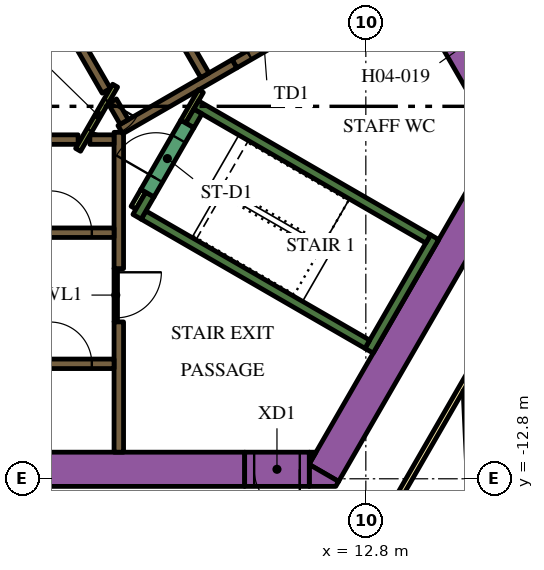
"""IFC4 building model, lengths in metres.
Left out: names, types, materials, properties, quantities, classifications, styles, units other than length and angle.
Written with IfcOpenShell. Run it as: python <this file> out.ifc"""

import sys

from ifc_helpers import new_model, si_unit, direction, frame, frame_2d, origin, place, context, subcontext, project, spatial, polyline, rectangle, outline, extrude, element, fill, save


model = new_model("IFC4")
c1 = context("Model", 3, precision=1e-05, world=origin(), true_north=direction((0.0, 1.0)))
c2 = subcontext(c1, "Body", "Model", "MODEL_VIEW")
j1 = project(units=[si_unit("LENGTHUNIT", "METRE"), si_unit("PLANEANGLEUNIT", "RADIAN")], contexts=[c1])
p1 = place(None, origin())
s1 = spatial("IfcSite", under=j1, at=p1, CompositionType="ELEMENT")
p2 = place(p1, origin())
s2 = spatial("IfcBuilding", under=s1, at=p2, CompositionType="ELEMENT")
p3 = place(p2, frame((0.0, 0.0, 66.6)))
s3 = spatial("IfcBuildingStorey", under=s2, at=p3, CompositionType="ELEMENT", Elevation=66.6)
p4 = place(p3, frame((6.461, 13.909, 0.0), z_axis=(0.0, 0.0, 1.0), x_axis=(0.500005804227, -0.866022052686, 0.0)))
e1 = element("IfcWall", 1, at=p4, inside=s3, PredefinedType="SOLIDWALL", context=c2, shape_type="SweptSolid", body=[
    extrude(rectangle(XDim=20.834, YDim=0.9, at=frame_2d((10.417, 0.0))), origin(), (0.0, 0.0, 1.0), 3.9),
])
p5 = place(p3, frame((11.695, -12.644, 0.0), z_axis=(0.0, 0.0, 1.0), x_axis=(0.500010229568, 0.86601949766, 0.0)))
e2 = element("IfcWall", 2, at=p5, inside=s3, PredefinedType="SOLIDWALL", context=c2, shape_type="SweptSolid", body=[
    extrude(rectangle(XDim=9.326, YDim=0.9, at=frame_2d((4.663, 0.0))), origin(), (0.0, 0.0, 1.0), 3.9),
])
p6 = place(p3, origin())
e3 = element("IfcWall", 3, at=p6, inside=s3, PredefinedType="SOLIDWALL", context=c2, shape_type="SweptSolid", body=[
    extrude(outline(polyline([(12.009, -13.0), (11.312, -13.0), (11.312, -12.425), (12.083, -12.871), (12.009, -13.0)])), origin(), (0.0, 0.0, 1.0), 3.9),
])
e4 = element("IfcWall", 4, at=p6, inside=s3, PredefinedType="SOLIDWALL", context=c2, shape_type="SweptSolid", body=[
    extrude(outline(polyline([(11.489, -12.1), (11.312, -12.407), (11.312, -12.1), (11.489, -12.1)])), origin(), (0.0, 0.0, 1.0), 3.9),
])
p7 = place(p3, frame((-12.019, -12.55, 0.0), z_axis=(0.0, 0.0, 1.0), x_axis=(1.0, 0.0, 0.0)))
e5 = element("IfcWall", 5, at=p7, inside=s3, PredefinedType="SOLIDWALL", context=c2, shape_type="SweptSolid", body=[
    extrude(rectangle(XDim=21.63, YDim=0.9, at=frame_2d((10.815, 0.0))), origin(), (0.0, 0.0, 1.0), 3.9),
])
p8 = place(p3, frame((12.885, -9.431, 0.0), z_axis=(0.0, 0.0, 1.0), x_axis=(0.500020560727, 0.866013532718, 0.0)))
e6 = element("IfcWall", 6, at=p8, inside=s3, PredefinedType="SOLIDWALL", context=c2, shape_type="SweptSolid", body=[
    extrude(rectangle(XDim=3.45, YDim=0.25, at=frame_2d((1.725, 0.0))), origin(), (0.0, 0.0, 1.0), 3.9),
])
p9 = place(p3, frame((12.84, -9.261, 0.0), z_axis=(0.0, 0.0, 1.0), x_axis=(-0.866013990052, 0.500019768644, 0.0)))
e7 = element("IfcWall", 7, at=p9, inside=s3, PredefinedType="SOLIDWALL", context=c2, shape_type="SweptSolid", body=[
    extrude(rectangle(XDim=6.8, YDim=0.25, at=frame_2d((3.4, 0.0))), origin(), (0.0, 0.0, 1.0), 3.9),
])
p10 = place(p3, frame((6.78, -5.906, 0.0), z_axis=(0.0, 0.0, 1.0), x_axis=(0.500223362819, 0.865896406789, 0.0)))
e8 = element("IfcWall", 8, at=p10, inside=s3, PredefinedType="SOLIDWALL", context=c2, shape_type="SweptSolid", body=[
    extrude(rectangle(XDim=0.675, YDim=0.25, at=frame_2d((0.337, 0.0))), origin(), (0.0, 0.0, 1.0), 3.9),
])
p11 = place(p3, frame((8.334, -2.964, 0.0), z_axis=(0.0, 0.0, 1.0), x_axis=(0.866016039709, -0.500016218704, 0.0)))
e9 = element("IfcWall", 9, at=p11, inside=s3, PredefinedType="SOLIDWALL", context=c2, shape_type="SweptSolid", body=[
    extrude(rectangle(XDim=7.05, YDim=0.25, at=frame_2d((3.525, 0.0))), origin(), (0.0, 0.0, 1.0), 3.9),
])
p12 = place(p3, frame((8.168, -3.503, 0.0), z_axis=(0.0, 0.0, 1.0), x_axis=(0.49972245349, 0.866185586049, 0.0)))
e10 = element("IfcWall", 10, at=p12, inside=s3, PredefinedType="SOLIDWALL", context=c2, shape_type="SweptSolid", body=[
    extrude(rectangle(XDim=0.425, YDim=0.25, at=frame_2d((0.212, 0.0))), origin(), (0.0, 0.0, 1.0), 3.9),
])
p13 = place(p3, frame((-5.259, -3.875, 0.0), z_axis=(0.0, 0.0, 1.0), x_axis=(1.0, 0.0, 0.0)))
e11 = element("IfcWall", 11, at=p13, inside=s3, PredefinedType="SOLIDWALL", context=c2, shape_type="SweptSolid", body=[
    extrude(rectangle(XDim=10.489, YDim=0.25, at=frame_2d((5.244, 0.0))), origin(), (0.0, 0.0, 1.0), 3.9),
])
p14 = place(p3, frame((6.3, -7.27, 0.0), z_axis=(0.0, 0.0, 1.0), x_axis=(0.0, 1.0, 0.0)))
e12 = element("IfcWall", 12, at=p14, inside=s3, PredefinedType="SOLIDWALL", context=c2, shape_type="SweptSolid", body=[
    extrude(rectangle(XDim=3.586, YDim=0.25, at=frame_2d((1.793, 0.0))), origin(), (0.0, 0.0, 1.0), 3.9),
])
p15 = place(p3, frame((6.3, -12.1, 0.0), z_axis=(0.0, 0.0, 1.0), x_axis=(0.0, 1.0, 0.0)))
e13 = element("IfcWall", 13, at=p15, inside=s3, PredefinedType="SOLIDWALL", context=c2, shape_type="SweptSolid", body=[
    extrude(rectangle(XDim=3.428, YDim=0.25, at=frame_2d((1.714, 0.0))), origin(), (0.0, 0.0, 1.0), 3.9),
])
p16 = place(p3, frame((5.538, -3.875, 0.0), z_axis=(0.0, 0.0, 1.0), x_axis=(1.0, 0.0, 0.0)))
e14 = element("IfcWall", 14, at=p16, inside=s3, PredefinedType="SOLIDWALL", context=c2, shape_type="SweptSolid", body=[
    extrude(rectangle(XDim=0.637, YDim=0.25, at=frame_2d((0.318, 0.0))), origin(), (0.0, 0.0, 1.0), 3.9),
])
p17 = place(p3, frame((9.346, -1.879, 0.0), z_axis=(0.0, 0.0, 1.0), x_axis=(-0.866048528039, -0.499959945477, 0.0)))
e15 = element("IfcWall", 15, at=p17, inside=s3, PredefinedType="SOLIDWALL", context=c2, shape_type="SweptSolid", body=[
    extrude(rectangle(XDim=3.47, YDim=0.25, at=frame_2d((1.735, 0.0))), origin(), (0.0, 0.0, 1.0), 3.9),
])
p18 = place(p3, frame((6.13, -2.867, 0.0), z_axis=(0.0, 0.0, 1.0), x_axis=(0.500160776593, -0.865932559475, 0.0)))
e16 = element("IfcWall", 16, at=p18, inside=s3, PredefinedType="SOLIDWALL", context=c2, shape_type="SweptSolid", body=[
    extrude(rectangle(XDim=0.627, YDim=0.25, at=frame_2d((0.313, 0.0))), origin(), (0.0, 0.0, 1.0), 3.9),
])
p19 = place(p3, frame((5.97, -2.591, 0.0), z_axis=(0.0, 0.0, 1.0), x_axis=(-0.499994469932, 0.866028596547, 0.0)))
e17 = element("IfcWall", 17, at=p19, inside=s3, PredefinedType="SOLIDWALL", context=c2, shape_type="SweptSolid", body=[
    extrude(rectangle(XDim=10.488, YDim=0.25, at=frame_2d((5.244, 0.0))), origin(), (0.0, 0.0, 1.0), 3.9),
])
p20 = place(p3, frame((6.945, -5.222, 0.0), z_axis=(0.0, 0.0, 1.0), x_axis=(-0.499818422106, -0.866130212453, 0.0)))
e18 = element("IfcWall", 18, at=p20, inside=s3, PredefinedType="PARTITIONING", context=c2, shape_type="SweptSolid", body=[
    extrude(rectangle(XDim=0.514, YDim=0.15, at=frame_2d((0.257, 0.0))), origin(), (0.0, 0.0, 1.0), 2.75),
])
p21 = place(p3, frame((8.459, -2.599, 0.0), z_axis=(0.0, 0.0, 1.0), x_axis=(-0.500041054325, -0.866001699761, 0.0)))
e19 = element("IfcWall", 19, at=p21, inside=s3, PredefinedType="PARTITIONING", context=c2, shape_type="SweptSolid", body=[
    extrude(rectangle(XDim=0.929, YDim=0.15, at=frame_2d((0.464, 0.0))), origin(), (0.0, 0.0, 1.0), 3.9),
])
p22 = place(p3, frame((-6.175, -9.775, 0.0), z_axis=(0.0, 0.0, 1.0), x_axis=(1.0, 0.0, 0.0)))
e20 = element("IfcWall", 20, at=p22, inside=s3, PredefinedType="SOLIDWALL", context=c2, shape_type="SweptSolid", body=[
    extrude(rectangle(XDim=12.35, YDim=0.25, at=frame_2d((6.175, 0.0))), origin(), (0.0, 0.0, 1.0), 3.9),
])
p23 = place(p22, frame((0.585, 0.0, 0.0)))
e21 = element("IfcOpeningElement", 21, at=p23, cuts=e20, PredefinedType="OPENING", context=c2, shape_type="SweptSolid", body=[
    extrude(rectangle(XDim=1.1, YDim=2.1, at=frame_2d((0.55, 1.05))), frame((0.0, 0.135, 0.0), z_axis=(0.0, -1.0, 0.0), x_axis=(1.0, 0.0, 0.0)), (0.0, 0.0, 1.0), 0.27),
])
p24 = place(p22, frame((3.105, 0.0, 0.0)))
e22 = element("IfcOpeningElement", 22, at=p24, cuts=e20, PredefinedType="OPENING", context=c2, shape_type="SweptSolid", body=[
    extrude(rectangle(XDim=1.1, YDim=2.1, at=frame_2d((0.55, 1.05))), frame((0.0, 0.135, 0.0), z_axis=(0.0, -1.0, 0.0), x_axis=(1.0, 0.0, 0.0)), (0.0, 0.0, 1.0), 0.27),
])
p25 = place(p22, frame((5.625, 0.0, 0.0)))
e23 = element("IfcOpeningElement", 23, at=p25, cuts=e20, PredefinedType="OPENING", context=c2, shape_type="SweptSolid", body=[
    extrude(rectangle(XDim=1.1, YDim=2.1, at=frame_2d((0.55, 1.05))), frame((0.0, 0.135, 0.0), z_axis=(0.0, -1.0, 0.0), x_axis=(1.0, 0.0, 0.0)), (0.0, 0.0, 1.0), 0.27),
])
p26 = place(p22, frame((8.145, 0.0, 0.0)))
e24 = element("IfcOpeningElement", 24, at=p26, cuts=e20, PredefinedType="OPENING", context=c2, shape_type="SweptSolid", body=[
    extrude(rectangle(XDim=1.1, YDim=2.1, at=frame_2d((0.55, 1.05))), frame((0.0, 0.135, 0.0), z_axis=(0.0, -1.0, 0.0), x_axis=(1.0, 0.0, 0.0)), (0.0, 0.0, 1.0), 0.27),
])
p27 = place(p22, frame((10.665, 0.0, 0.0)))
e25 = element("IfcOpeningElement", 25, at=p27, cuts=e20, PredefinedType="OPENING", context=c2, shape_type="SweptSolid", body=[
    extrude(rectangle(XDim=1.1, YDim=2.1, at=frame_2d((0.55, 1.05))), frame((0.0, 0.135, 0.0), z_axis=(0.0, -1.0, 0.0), x_axis=(1.0, 0.0, 0.0)), (0.0, 0.0, 1.0), 0.27),
])
p28 = place(p3, frame((-6.175, -6.325, 0.0), z_axis=(0.0, 0.0, 1.0), x_axis=(1.0, 0.0, 0.0)))
e26 = element("IfcWall", 26, at=p28, inside=s3, PredefinedType="SOLIDWALL", context=c2, shape_type="SweptSolid", body=[
    extrude(rectangle(XDim=12.35, YDim=0.25, at=frame_2d((6.175, 0.0))), origin(), (0.0, 0.0, 1.0), 3.9),
])
p29 = place(p28, frame((3.205, 0.0, 0.0)))
e27 = element("IfcOpeningElement", 27, at=p29, cuts=e26, PredefinedType="OPENING", context=c2, shape_type="SweptSolid", body=[
    extrude(rectangle(XDim=0.9, YDim=2.1, at=frame_2d((0.45, 1.05))), frame((0.0, 0.135, 0.0), z_axis=(0.0, -1.0, 0.0), x_axis=(1.0, 0.0, 0.0)), (0.0, 0.0, 1.0), 0.27),
])
p30 = place(p28, frame((8.145, 0.0, 0.0)))
e28 = element("IfcOpeningElement", 28, at=p30, cuts=e26, PredefinedType="OPENING", context=c2, shape_type="SweptSolid", body=[
    extrude(rectangle(XDim=1.1, YDim=2.1, at=frame_2d((0.55, 1.05))), frame((0.0, 0.135, 0.0), z_axis=(0.0, -1.0, 0.0), x_axis=(1.0, 0.0, 0.0)), (0.0, 0.0, 1.0), 0.27),
])
p31 = place(p28, frame((10.665, 0.0, 0.0)))
e29 = element("IfcOpeningElement", 29, at=p31, cuts=e26, PredefinedType="OPENING", context=c2, shape_type="SweptSolid", body=[
    extrude(rectangle(XDim=1.1, YDim=2.1, at=frame_2d((0.55, 1.05))), frame((0.0, 0.135, 0.0), z_axis=(0.0, -1.0, 0.0), x_axis=(1.0, 0.0, 0.0)), (0.0, 0.0, 1.0), 0.27),
])
p32 = place(p3, frame((8.565, -2.185, 0.0), z_axis=(0.0, 0.0, 1.0), x_axis=(-0.499997954832, 0.866026584559, 0.0)))
e30 = element("IfcWall", 30, at=p32, inside=s3, PredefinedType="SOLIDWALL", context=c2, shape_type="SweptSolid", body=[
    extrude(rectangle(XDim=12.35, YDim=0.25, at=frame_2d((6.175, 0.0))), origin(), (0.0, 0.0, 1.0), 3.9),
])
p33 = place(p32, frame((5.725, 0.0, 0.0)))
e31 = element("IfcOpeningElement", 31, at=p33, cuts=e30, PredefinedType="OPENING", context=c2, shape_type="SweptSolid", body=[
    extrude(rectangle(XDim=0.9, YDim=2.1, at=frame_2d((0.45, 1.05))), frame((0.0, 0.135, 0.0), z_axis=(0.0, -1.0, 0.0), x_axis=(1.0, 0.0, 0.0)), (0.0, 0.0, 1.0), 0.27),
])
p34 = place(p3, frame((7.053, -5.284, 0.0), z_axis=(0.0, 0.0, 1.0), x_axis=(0.500078061341, 0.865980330357, 0.0)))
e32 = element("IfcWall", 32, at=p34, inside=s3, PredefinedType="SOLIDWALL", context=c2, shape_type="SweptSolid", body=[
    extrude(rectangle(XDim=2.1, YDim=0.4, at=frame_2d((1.05, 0.0))), origin(), (0.0, 0.0, 1.0), 3.9),
])
p35 = place(p34, frame((0.45, 0.0, 0.0)))
e33 = element("IfcOpeningElement", 33, at=p35, cuts=e32, PredefinedType="OPENING", context=c2, shape_type="SweptSolid", body=[
    extrude(rectangle(XDim=1.2, YDim=2.1, at=frame_2d((0.6, 1.05))), frame((0.0, 0.21, 0.0), z_axis=(0.0, -1.0, 0.0), x_axis=(1.0, 0.0, 0.0)), (0.0, 0.0, 1.0), 0.42),
])
p36 = place(p3, frame((9.346, -1.879, 0.0), z_axis=(0.0, 0.0, 1.0), x_axis=(0.866047807691, 0.499961193289, 0.0)))
e34 = element("IfcWall", 34, at=p36, inside=s3, PredefinedType="SOLIDWALL", context=c2, shape_type="SweptSolid", body=[
    extrude(rectangle(XDim=1.8, YDim=0.25, at=frame_2d((0.9, 0.0))), origin(), (0.0, 0.0, 1.0), 3.9),
])
p37 = place(p36, frame((0.45, 0.0, 0.0)))
e35 = element("IfcOpeningElement", 35, at=p37, cuts=e34, PredefinedType="OPENING", context=c2, shape_type="SweptSolid", body=[
    extrude(rectangle(XDim=0.9, YDim=2.1, at=frame_2d((0.45, 1.05))), frame((0.0, 0.135, 0.0), z_axis=(0.0, -1.0, 0.0), x_axis=(1.0, 0.0, 0.0)), (0.0, 0.0, 1.0), 0.27),
])
p38 = place(p3, frame((6.203, -2.456, 0.0), z_axis=(0.0, 0.0, 1.0), x_axis=(-0.500043961785, -0.866000020948, 0.0)))
e36 = element("IfcWall", 36, at=p38, inside=s3, PredefinedType="PARTITIONING", context=c2, shape_type="SweptSolid", body=[
    extrude(rectangle(XDim=1.95, YDim=0.15, at=frame_2d((0.975, 0.0))), origin(), (0.0, 0.0, 1.0), 3.9),
])
p39 = place(p38, frame((0.45, 0.0, 0.0)))
e37 = element("IfcOpeningElement", 37, at=p39, cuts=e36, PredefinedType="OPENING", context=c2, shape_type="SweptSolid", body=[
    extrude(rectangle(XDim=0.9, YDim=2.1, at=frame_2d((0.45, 1.05))), frame((0.0, 0.085, 0.0), z_axis=(0.0, -1.0, 0.0), x_axis=(1.0, 0.0, 0.0)), (0.0, 0.0, 1.0), 0.17),
])
p40 = place(p3, frame((6.22, -7.266, 0.0), z_axis=(0.0, 0.0, 1.0), x_axis=(0.0, -1.0, 0.0)))
e38 = element("IfcWall", 38, at=p40, inside=s3, PredefinedType="PARTITIONING", context=c2, shape_type="SweptSolid", body=[
    extrude(rectangle(XDim=1.4, YDim=0.09, at=frame_2d((0.7, 0.0))), origin(), (0.0, 0.0, 1.0), 2.75),
])
p41 = place(p40, frame((0.1, 0.0, 0.0)))
e39 = element("IfcOpeningElement", 39, at=p41, cuts=e38, PredefinedType="OPENING", context=c2, shape_type="SweptSolid", body=[
    extrude(rectangle(XDim=1.2, YDim=2.1, at=frame_2d((0.6, 1.05))), frame((0.0, 0.055, 0.0), z_axis=(0.0, -1.0, 0.0), x_axis=(1.0, 0.0, 0.0)), (0.0, 0.0, 1.0), 0.11),
])
p42 = place(p3, frame((11.312, -12.55, 0.0), z_axis=(0.0, 0.0, 1.0), x_axis=(-1.0, 0.0, 0.0)))
e40 = element("IfcWall", 40, at=p42, inside=s3, PredefinedType="SOLIDWALL", context=c2, shape_type="SweptSolid", body=[
    extrude(rectangle(XDim=1.7, YDim=0.9, at=frame_2d((0.85, 0.0))), origin(), (0.0, 0.0, 1.0), 3.9),
])
p43 = place(p42, frame((0.25, 0.0, 0.0)))
e41 = element("IfcOpeningElement", 41, at=p43, cuts=e40, PredefinedType="OPENING", context=c2, shape_type="SweptSolid", body=[
    extrude(rectangle(XDim=1.2, YDim=2.1, at=frame_2d((0.6, 1.05))), frame((0.0, 0.46, 0.0), z_axis=(0.0, -1.0, 0.0), x_axis=(1.0, 0.0, 0.0)), (0.0, 0.0, 1.0), 0.92),
])
p44 = place(p3, frame((6.163, 18.475, 0.0), z_axis=(0.0, 0.0, 1.0), x_axis=(0.500001317485, -0.866024643133, 0.0)))
e42 = element("IfcWall", 42, at=p44, inside=s3, PredefinedType="PARTITIONING", context=c2, shape_type="SweptSolid", body=[
    extrude(rectangle(XDim=25.767, YDim=0.15, at=frame_2d((12.883, 0.0))), origin(), (0.0, 0.0, 1.0), 2.75),
])
p45 = place(p44, frame((21.138, 0.0, 0.0)))
e43 = element("IfcOpeningElement", 43, at=p45, cuts=e42, PredefinedType="OPENING", context=c2, shape_type="SweptSolid", body=[
    extrude(rectangle(XDim=1.0, YDim=2.1, at=frame_2d((0.5, 1.05))), frame((0.0, 0.085, 0.0), z_axis=(0.0, -1.0, 0.0), x_axis=(1.0, 0.0, 0.0)), (0.0, 0.0, 1.0), 0.17),
])
p46 = place(p44, frame((9.948, 0.0, 0.0)))
e44 = element("IfcOpeningElement", 44, at=p46, cuts=e42, PredefinedType="OPENING", context=c2, shape_type="SweptSolid", body=[
    extrude(rectangle(XDim=1.1, YDim=2.1, at=frame_2d((0.55, 1.05))), frame((0.0, 0.085, 0.0), z_axis=(0.0, -1.0, 0.0), x_axis=(1.0, 0.0, 0.0)), (0.0, 0.0, 1.0), 0.17),
])
p47 = place(p44, frame((8.641, 0.0, 0.0)))
e45 = element("IfcOpeningElement", 45, at=p47, cuts=e42, PredefinedType="OPENING", context=c2, shape_type="SweptSolid", body=[
    extrude(rectangle(XDim=1.0, YDim=2.1, at=frame_2d((0.5, 1.05))), frame((0.0, 0.085, 0.0), z_axis=(0.0, -1.0, 0.0), x_axis=(1.0, 0.0, 0.0)), (0.0, 0.0, 1.0), 0.17),
])
p48 = place(p44, frame((0.18, 0.0, 0.0)))
e46 = element("IfcOpeningElement", 46, at=p48, cuts=e42, PredefinedType="OPENING", context=c2, shape_type="SweptSolid", body=[
    extrude(rectangle(XDim=1.0, YDim=2.1, at=frame_2d((0.5, 1.05))), frame((0.0, 0.085, 0.0), z_axis=(0.0, -1.0, 0.0), x_axis=(1.0, 0.0, 0.0)), (0.0, 0.0, 1.0), 0.17),
])
p49 = place(p3, frame((15.587, -9.952, 0.0), z_axis=(0.0, 0.0, 1.0), x_axis=(-0.500016618951, -0.866015808616, 0.0)))
e47 = element("IfcWall", 47, at=p49, inside=s3, PredefinedType="PARTITIONING", context=c2, shape_type="SweptSolid", body=[
    extrude(rectangle(XDim=5.268, YDim=0.15, at=frame_2d((2.634, 0.0))), origin(), (0.0, 0.0, 1.0), 2.75),
])
p50 = place(p3, frame((15.973, -22.109, 0.0), z_axis=(0.0, 0.0, 1.0), x_axis=(-0.046191717129, 0.998932592955, 0.0)))
e48 = element("IfcWall", 48, at=p50, inside=s3, PredefinedType="PARTITIONING", context=c2, shape_type="SweptSolid", body=[
    extrude(rectangle(XDim=11.638, YDim=0.15, at=frame_2d((5.819, 0.0))), origin(), (0.0, 0.0, 1.0), 2.75),
])
p51 = place(p27, origin())
e49 = element("IfcDoor", 49, at=p51, inside=s3, OperationType="DOUBLE_DOOR_SLIDING", PredefinedType="DOOR", context=c2, shape_type="SweptSolid", body=[
    extrude(rectangle(XDim=1.1, YDim=2.1, at=frame_2d((0.55, 1.05))), frame((0.0, 0.025, 0.0), z_axis=(0.0, -1.0, 0.0), x_axis=(1.0, 0.0, 0.0)), (0.0, 0.0, 1.0), 0.05),
])
fill(e25, e49)
p52 = place(p31, origin())
e50 = element("IfcDoor", 50, at=p52, inside=s3, OperationType="DOUBLE_DOOR_SLIDING", PredefinedType="DOOR", context=c2, shape_type="SweptSolid", body=[
    extrude(rectangle(XDim=1.1, YDim=2.1, at=frame_2d((0.55, 1.05))), frame((0.0, 0.025, 0.0), z_axis=(0.0, -1.0, 0.0), x_axis=(1.0, 0.0, 0.0)), (0.0, 0.0, 1.0), 0.05),
])
fill(e29, e50)
p53 = place(p35, origin())
e51 = element("IfcDoor", 51, at=p53, inside=s3, OperationType="SINGLE_SWING_LEFT", PredefinedType="DOOR", context=c2, shape_type="SweptSolid", body=[
    extrude(rectangle(XDim=1.2, YDim=2.1, at=frame_2d((0.6, 1.05))), frame((0.0, 0.025, 0.0), z_axis=(0.0, -1.0, 0.0), x_axis=(1.0, 0.0, 0.0)), (0.0, 0.0, 1.0), 0.05),
])
fill(e33, e51)
p54 = place(p37, origin())
e52 = element("IfcDoor", 52, at=p54, inside=s3, OperationType="SINGLE_SWING_LEFT", PredefinedType="DOOR", context=c2, shape_type="SweptSolid", body=[
    extrude(rectangle(XDim=0.9, YDim=2.1, at=frame_2d((0.45, 1.05))), frame((0.0, 0.025, 0.0), z_axis=(0.0, -1.0, 0.0), x_axis=(1.0, 0.0, 0.0)), (0.0, 0.0, 1.0), 0.05),
])
fill(e35, e52)
p55 = place(p39, origin())
e53 = element("IfcDoor", 53, at=p55, inside=s3, OperationType="SINGLE_SWING_LEFT", PredefinedType="DOOR", context=c2, shape_type="SweptSolid", body=[
    extrude(rectangle(XDim=0.9, YDim=2.1, at=frame_2d((0.45, 1.05))), frame((0.0, 0.025, 0.0), z_axis=(0.0, -1.0, 0.0), x_axis=(1.0, 0.0, 0.0)), (0.0, 0.0, 1.0), 0.05),
])
fill(e37, e53)
p56 = place(p41, origin())
e54 = element("IfcDoor", 54, at=p56, inside=s3, OperationType="SINGLE_SWING_LEFT", PredefinedType="DOOR", context=c2, shape_type="SweptSolid", body=[
    extrude(rectangle(XDim=1.2, YDim=2.1, at=frame_2d((0.6, 1.05))), frame((0.0, 0.025, 0.0), z_axis=(0.0, -1.0, 0.0), x_axis=(1.0, 0.0, 0.0)), (0.0, 0.0, 1.0), 0.05),
])
fill(e39, e54)
p57 = place(p43, origin())
e55 = element("IfcDoor", 55, at=p57, inside=s3, OperationType="SINGLE_SWING_LEFT", PredefinedType="DOOR", context=c2, shape_type="SweptSolid", body=[
    extrude(rectangle(XDim=1.2, YDim=2.1, at=frame_2d((0.6, 1.05))), frame((0.0, 0.025, 0.0), z_axis=(0.0, -1.0, 0.0), x_axis=(1.0, 0.0, 0.0)), (0.0, 0.0, 1.0), 0.05),
])
fill(e41, e55)
save(model, sys.argv[1])
